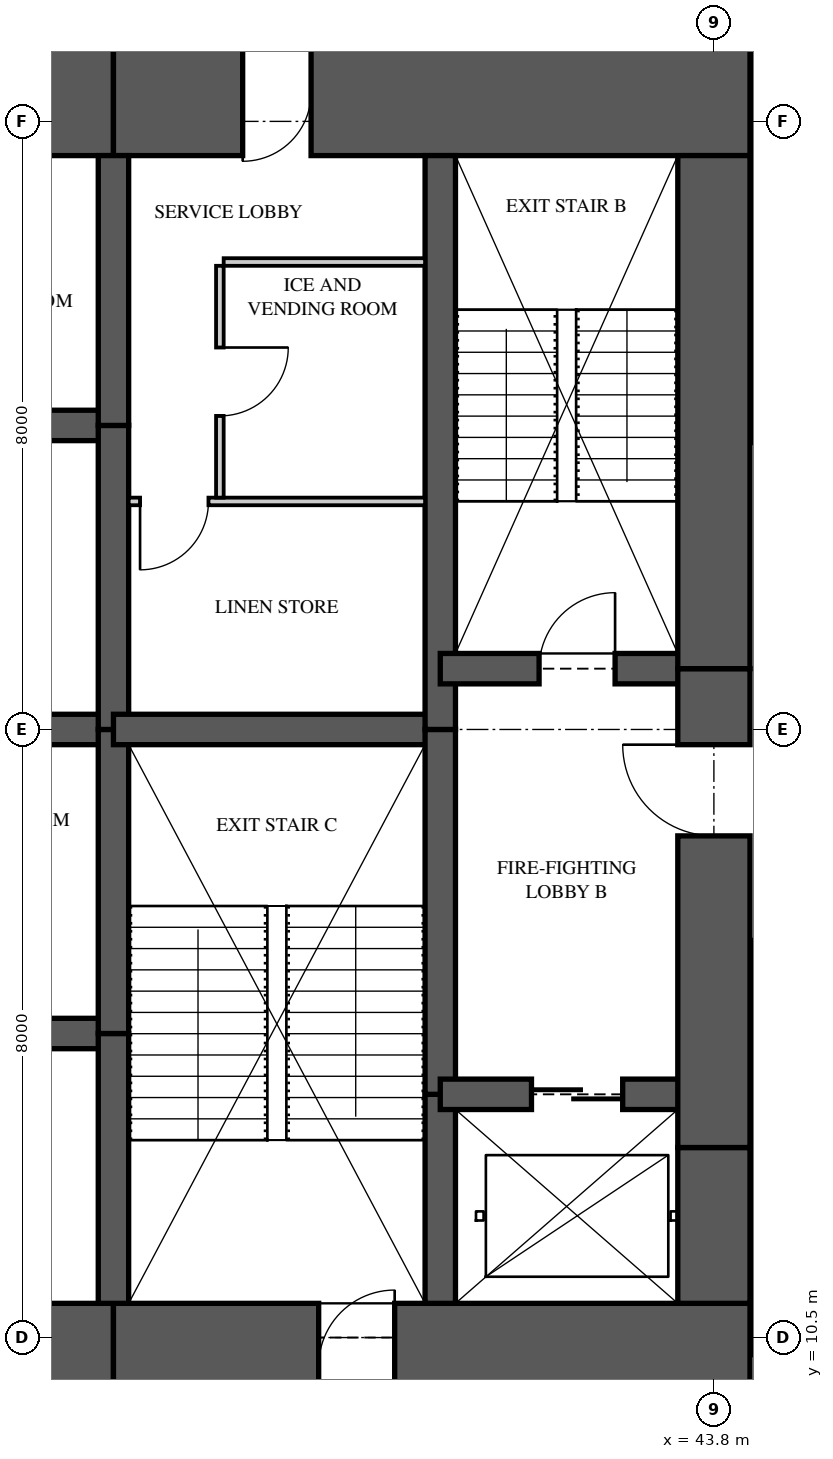
"""IFC4 building model, lengths in metres.
Left out: names, types, materials, properties, quantities, classifications, styles, units other than length and angle.
Written with IfcOpenShell. Run it as: python <this file> out.ifc"""

import sys

from ifc_helpers import new_model, si_unit, direction, frame, frame_2d, origin, place, context, subcontext, project, spatial, rectangle, extrude, element, fill, save


model = new_model("IFC4")
c1 = context("Model", 3, precision=1e-05, world=origin(), true_north=direction((0.0, 1.0)))
c2 = subcontext(c1, "Body", "Model", "MODEL_VIEW")
j1 = project(units=[si_unit("LENGTHUNIT", "METRE"), si_unit("PLANEANGLEUNIT", "RADIAN")], contexts=[c1])
p1 = place(None, origin())
s1 = spatial("IfcSite", under=j1, at=p1, CompositionType="ELEMENT")
p2 = place(p1, origin())
s2 = spatial("IfcBuilding", under=s1, at=p2, CompositionType="ELEMENT")
p3 = place(p2, frame((0.0, 0.0, 27.7)))
s3 = spatial("IfcBuildingStorey", under=s2, at=p3, CompositionType="ELEMENT", Elevation=27.7)
p4 = place(p3, frame((31.6, 10.125, 0.0), z_axis=(0.0, 0.0, 1.0), x_axis=(1.0, 0.0, 0.0)))
e1 = element("IfcWall", 1, at=p4, inside=s3, PredefinedType="SHEAR", context=c2, shape_type="SweptSolid", body=[
    extrude(rectangle(XDim=4.3, YDim=1.65, at=frame_2d((2.15, 0.0))), origin(), (0.0, 0.0, 1.0), 3.35),
])
p5 = place(p3, frame((35.9, 10.125, 0.0), z_axis=(0.0, 0.0, 1.0), x_axis=(1.0, 0.0, 0.0)))
e2 = element("IfcWall", 2, at=p5, inside=s3, PredefinedType="SHEAR", context=c2, shape_type="SweptSolid", body=[
    extrude(rectangle(XDim=8.375, YDim=1.65, at=frame_2d((4.188, 0.0))), origin(), (0.0, 0.0, 1.0), 3.35),
])
p6 = place(p5, frame((2.7, 0.0, 0.0)))
e3 = element("IfcOpeningElement", 3, at=p6, cuts=e2, PredefinedType="OPENING", context=c2, shape_type="SweptSolid", body=[
    extrude(rectangle(XDim=1.0, YDim=2.1, at=frame_2d((0.5, 1.05))), frame((0.0, 0.835, 0.0), z_axis=(0.0, -1.0, 0.0), x_axis=(1.0, 0.0, 0.0)), (0.0, 0.0, 1.0), 1.67),
])
p7 = place(p3, frame((44.275, 26.875, 0.0), z_axis=(0.0, 0.0, 1.0), x_axis=(-1.0, 0.0, 0.0)))
e4 = element("IfcWall", 4, at=p7, inside=s3, PredefinedType="SHEAR", context=c2, shape_type="SweptSolid", body=[
    extrude(rectangle(XDim=8.375, YDim=1.65, at=frame_2d((4.188, 0.0))), origin(), (0.0, 0.0, 1.0), 3.35),
])
p8 = place(p7, frame((5.775, 0.0, 0.0)))
e5 = element("IfcOpeningElement", 5, at=p8, cuts=e4, PredefinedType="OPENING", context=c2, shape_type="SweptSolid", body=[
    extrude(rectangle(XDim=0.9, YDim=2.1, at=frame_2d((0.45, 1.05))), frame((0.0, 0.835, 0.0), z_axis=(0.0, -1.0, 0.0), x_axis=(1.0, 0.0, 0.0)), (0.0, 0.0, 1.0), 1.67),
])
p9 = place(p3, frame((35.9, 26.875, 0.0), z_axis=(0.0, 0.0, 1.0), x_axis=(-1.0, 0.0, 0.0)))
e6 = element("IfcWall", 6, at=p9, inside=s3, PredefinedType="SHEAR", context=c2, shape_type="SweptSolid", body=[
    extrude(rectangle(XDim=4.3, YDim=1.65, at=frame_2d((2.15, 0.0))), origin(), (0.0, 0.0, 1.0), 3.35),
])
p10 = place(p3, frame((43.8, 10.95, 0.0), z_axis=(0.0, 0.0, 1.0), x_axis=(0.0, 1.0, 0.0)))
e7 = element("IfcWall", 7, at=p10, inside=s3, PredefinedType="SHEAR", context=c2, shape_type="SweptSolid", body=[
    extrude(rectangle(XDim=2.05, YDim=0.95, at=frame_2d((1.025, 0.0))), origin(), (0.0, 0.0, 1.0), 3.35),
])
p11 = place(p3, frame((43.8, 13.0, 0.0), z_axis=(0.0, 0.0, 1.0), x_axis=(0.0, 1.0, 0.0)))
e8 = element("IfcWall", 8, at=p11, inside=s3, PredefinedType="SHEAR", context=c2, shape_type="SweptSolid", body=[
    extrude(rectangle(XDim=6.3, YDim=0.95, at=frame_2d((3.15, 0.0))), origin(), (0.0, 0.0, 1.0), 3.35),
])
p12 = place(p11, frame((4.1, 0.0, 0.0)))
e9 = element("IfcOpeningElement", 9, at=p12, cuts=e8, PredefinedType="OPENING", context=c2, shape_type="SweptSolid", body=[
    extrude(rectangle(XDim=1.2, YDim=2.2, at=frame_2d((0.6, 1.1))), frame((0.0, 0.485, 0.0), z_axis=(0.0, -1.0, 0.0), x_axis=(1.0, 0.0, 0.0)), (0.0, 0.0, 1.0), 0.97),
])
p13 = place(p3, frame((43.8, 19.3, 0.0), z_axis=(0.0, 0.0, 1.0), x_axis=(0.0, 1.0, 0.0)))
e10 = element("IfcWall", 10, at=p13, inside=s3, PredefinedType="SHEAR", context=c2, shape_type="SweptSolid", body=[
    extrude(rectangle(XDim=6.75, YDim=0.95, at=frame_2d((3.375, 0.0))), origin(), (0.0, 0.0, 1.0), 3.35),
])
p14 = place(p3, frame((35.9, 10.95, 0.0), z_axis=(0.0, 0.0, 1.0), x_axis=(0.0, 1.0, 0.0)))
e11 = element("IfcWall", 11, at=p14, inside=s3, PredefinedType="SHEAR", context=c2, shape_type="SweptSolid", body=[
    extrude(rectangle(XDim=3.55, YDim=0.4, at=frame_2d((1.775, 0.0))), origin(), (0.0, 0.0, 1.0), 3.35),
])
for number, where, z_axis, x_axis in (
    (12, (35.9, 14.5, 0.0), (0.0, 0.0, 1.0), (0.0, 1.0, 0.0)),
    (13, (35.9, 18.5, 0.0), (0.0, 0.0, 1.0), (0.0, 1.0, 0.0)),
):
    element("IfcWall", number, at=place(p3, frame(where, z_axis=z_axis, x_axis=x_axis)), inside=s3, PredefinedType="SHEAR", context=c2, shape_type="SweptSolid", body=[
        extrude(rectangle(XDim=4.0, YDim=0.4, at=frame_2d((2.0, 0.0))), origin(), (0.0, 0.0, 1.0), 3.35),
    ])
p15 = place(p3, frame((35.9, 22.5, 0.0), z_axis=(0.0, 0.0, 1.0), x_axis=(0.0, 1.0, 0.0)))
e14 = element("IfcWall", 14, at=p15, inside=s3, PredefinedType="SHEAR", context=c2, shape_type="SweptSolid", body=[
    extrude(rectangle(XDim=3.55, YDim=0.4, at=frame_2d((1.775, 0.0))), origin(), (0.0, 0.0, 1.0), 3.35),
])
p16 = place(p3, frame((40.2, 10.95, 0.0), z_axis=(0.0, 0.0, 1.0), x_axis=(0.0, 1.0, 0.0)))
e15 = element("IfcWall", 15, at=p16, inside=s3, PredefinedType="SHEAR", context=c2, shape_type="SweptSolid", body=[
    extrude(rectangle(XDim=2.75, YDim=0.4, at=frame_2d((1.375, 0.0))), origin(), (0.0, 0.0, 1.0), 3.35),
])
p17 = place(p3, frame((40.2, 13.7, 0.0), z_axis=(0.0, 0.0, 1.0), x_axis=(0.0, 1.0, 0.0)))
e16 = element("IfcWall", 16, at=p17, inside=s3, PredefinedType="SHEAR", context=c2, shape_type="SweptSolid", body=[
    extrude(rectangle(XDim=4.8, YDim=0.4, at=frame_2d((2.4, 0.0))), origin(), (0.0, 0.0, 1.0), 3.35),
])
p18 = place(p3, frame((40.2, 18.5, 0.0), z_axis=(0.0, 0.0, 1.0), x_axis=(0.0, 1.0, 0.0)))
e17 = element("IfcWall", 17, at=p18, inside=s3, PredefinedType="SHEAR", context=c2, shape_type="SweptSolid", body=[
    extrude(rectangle(XDim=7.55, YDim=0.4, at=frame_2d((3.775, 0.0))), origin(), (0.0, 0.0, 1.0), 3.35),
])
for number, where, z_axis, x_axis in (
    (18, (31.6, 14.5, 0.0), (0.0, 0.0, 1.0), (1.0, 0.0, 0.0)),
    (19, (31.6, 18.5, 0.0), (0.0, 0.0, 1.0), (1.0, 0.0, 0.0)),
    (20, (31.6, 22.5, 0.0), (0.0, 0.0, 1.0), (1.0, 0.0, 0.0)),
):
    element("IfcWall", number, at=place(p3, frame(where, z_axis=z_axis, x_axis=x_axis)), inside=s3, PredefinedType="SHEAR", context=c2, shape_type="SweptSolid", body=[
        extrude(rectangle(XDim=4.3, YDim=0.4, at=frame_2d((2.15, 0.0))), origin(), (0.0, 0.0, 1.0), 3.35),
    ])
p19 = place(p3, frame((35.9, 18.5, 0.0), z_axis=(0.0, 0.0, 1.0), x_axis=(1.0, 0.0, 0.0)))
e21 = element("IfcWall", 21, at=p19, inside=s3, PredefinedType="SHEAR", context=c2, shape_type="SweptSolid", body=[
    extrude(rectangle(XDim=4.3, YDim=0.4, at=frame_2d((2.15, 0.0))), origin(), (0.0, 0.0, 1.0), 3.35),
])
p20 = place(p3, frame((40.2, 13.7, 0.0), z_axis=(0.0, 0.0, 1.0), x_axis=(1.0, 0.0, 0.0)))
e22 = element("IfcWall", 22, at=p20, inside=s3, PredefinedType="SHEAR", context=c2, shape_type="SweptSolid", body=[
    extrude(rectangle(XDim=3.6, YDim=0.4, at=frame_2d((1.8, 0.0))), origin(), (0.0, 0.0, 1.0), 3.35),
])
p21 = place(p20, frame((1.2, 0.0, 0.0)))
e23 = element("IfcOpeningElement", 23, at=p21, cuts=e22, PredefinedType="OPENING", context=c2, shape_type="SweptSolid", body=[
    extrude(rectangle(XDim=1.2, YDim=2.1, at=frame_2d((0.6, 1.05))), frame((0.0, 0.21, 0.0), z_axis=(0.0, -1.0, 0.0), x_axis=(1.0, 0.0, 0.0)), (0.0, 0.0, 1.0), 0.42),
])
p22 = place(p3, frame((40.2, 19.3, 0.0), z_axis=(0.0, 0.0, 1.0), x_axis=(1.0, 0.0, 0.0)))
e24 = element("IfcWall", 24, at=p22, inside=s3, PredefinedType="SHEAR", context=c2, shape_type="SweptSolid", body=[
    extrude(rectangle(XDim=3.6, YDim=0.4, at=frame_2d((1.8, 0.0))), origin(), (0.0, 0.0, 1.0), 3.35),
])
p23 = place(p22, frame((1.3, 0.0, 0.0)))
e25 = element("IfcOpeningElement", 25, at=p23, cuts=e24, PredefinedType="OPENING", context=c2, shape_type="SweptSolid", body=[
    extrude(rectangle(XDim=1.0, YDim=2.1, at=frame_2d((0.5, 1.05))), frame((0.0, 0.21, 0.0), z_axis=(0.0, -1.0, 0.0), x_axis=(1.0, 0.0, 0.0)), (0.0, 0.0, 1.0), 0.42),
])
p24 = place(p3, frame((37.35, 24.65, 0.0), z_axis=(0.0, 0.0, 1.0), x_axis=(1.0, 0.0, 0.0)))
e26 = element("IfcWall", 26, at=p24, inside=s3, PredefinedType="PARTITIONING", context=c2, shape_type="SweptSolid", body=[
    extrude(rectangle(XDim=2.65, YDim=0.1, at=frame_2d((1.325, 0.0))), origin(), (0.0, 0.0, 1.0), 3.11),
])
p25 = place(p3, frame((37.3, 21.55, 0.0), z_axis=(0.0, 0.0, 1.0), x_axis=(0.0, 1.0, 0.0)))
e27 = element("IfcWall", 27, at=p25, inside=s3, PredefinedType="PARTITIONING", context=c2, shape_type="SweptSolid", body=[
    extrude(rectangle(XDim=3.05, YDim=0.1, at=frame_2d((1.525, 0.0))), origin(), (0.0, 0.0, 1.0), 3.11),
])
p26 = place(p25, frame((1.075, 0.0, 0.0)))
e28 = element("IfcOpeningElement", 28, at=p26, cuts=e27, PredefinedType="OPENING", context=c2, shape_type="SweptSolid", body=[
    extrude(rectangle(XDim=0.9, YDim=2.1, at=frame_2d((0.45, 1.05))), frame((0.0, 0.06, 0.0), z_axis=(0.0, -1.0, 0.0), x_axis=(1.0, 0.0, 0.0)), (0.0, 0.0, 1.0), 0.12),
])
p27 = place(p3, frame((36.1, 21.5, 0.0), z_axis=(0.0, 0.0, 1.0), x_axis=(1.0, 0.0, 0.0)))
e29 = element("IfcWall", 29, at=p27, inside=s3, PredefinedType="PARTITIONING", context=c2, shape_type="SweptSolid", body=[
    extrude(rectangle(XDim=3.9, YDim=0.1, at=frame_2d((1.95, 0.0))), origin(), (0.0, 0.0, 1.0), 3.11),
])
p28 = place(p27, frame((0.15, 0.0, 0.0)))
e30 = element("IfcOpeningElement", 30, at=p28, cuts=e29, PredefinedType="OPENING", context=c2, shape_type="SweptSolid", body=[
    extrude(rectangle(XDim=0.9, YDim=2.1, at=frame_2d((0.45, 1.05))), frame((0.0, 0.06, 0.0), z_axis=(0.0, -1.0, 0.0), x_axis=(1.0, 0.0, 0.0)), (0.0, 0.0, 1.0), 0.12),
])
p29 = place(p26, frame((0.9, 0.0, 0.0), z_axis=(0.0, 0.0, 1.0), x_axis=(-1.0, 0.0, 0.0)))
e31 = element("IfcDoor", 31, at=p29, inside=s3, OperationType="SINGLE_SWING_LEFT", PredefinedType="DOOR", context=c2, shape_type="SweptSolid", body=[
    extrude(rectangle(XDim=0.9, YDim=2.1, at=frame_2d((0.45, 1.05))), frame((0.0, 0.025, 0.0), z_axis=(0.0, -1.0, 0.0), x_axis=(1.0, 0.0, 0.0)), (0.0, 0.0, 1.0), 0.05),
])
fill(e28, e31)
p30 = place(p28, frame((0.9, 0.0, 0.0), z_axis=(0.0, 0.0, 1.0), x_axis=(-1.0, 0.0, 0.0)))
e32 = element("IfcDoor", 32, at=p30, inside=s3, OperationType="SINGLE_SWING_RIGHT", PredefinedType="DOOR", context=c2, shape_type="SweptSolid", body=[
    extrude(rectangle(XDim=0.9, YDim=2.1, at=frame_2d((0.45, 1.05))), frame((0.0, 0.025, 0.0), z_axis=(0.0, -1.0, 0.0), x_axis=(1.0, 0.0, 0.0)), (0.0, 0.0, 1.0), 0.05),
])
fill(e30, e32)
p31 = place(p23, origin())
e33 = element("IfcDoor", 33, at=p31, inside=s3, OperationType="SINGLE_SWING_RIGHT", PredefinedType="DOOR", context=c2, shape_type="SweptSolid", body=[
    extrude(rectangle(XDim=1.0, YDim=2.1, at=frame_2d((0.5, 1.05))), frame((0.0, 0.025, 0.0), z_axis=(0.0, -1.0, 0.0), x_axis=(1.0, 0.0, 0.0)), (0.0, 0.0, 1.0), 0.05),
])
fill(e25, e33)
p32 = place(p12, origin())
e34 = element("IfcDoor", 34, at=p32, inside=s3, OperationType="SINGLE_SWING_RIGHT", PredefinedType="DOOR", context=c2, shape_type="SweptSolid", body=[
    extrude(rectangle(XDim=1.2, YDim=2.2, at=frame_2d((0.6, 1.1))), frame((0.0, 0.025, 0.0), z_axis=(0.0, -1.0, 0.0), x_axis=(1.0, 0.0, 0.0)), (0.0, 0.0, 1.0), 0.05),
])
fill(e9, e34)
p33 = place(p21, origin())
e35 = element("IfcDoor", 35, at=p33, inside=s3, OperationType="SLIDING_TO_LEFT", PredefinedType="DOOR", context=c2, shape_type="SweptSolid", body=[
    extrude(rectangle(XDim=1.2, YDim=2.1, at=frame_2d((0.6, 1.05))), frame((0.0, 0.025, 0.0), z_axis=(0.0, -1.0, 0.0), x_axis=(1.0, 0.0, 0.0)), (0.0, 0.0, 1.0), 0.05),
])
fill(e23, e35)
p34 = place(p6, origin())
e36 = element("IfcDoor", 36, at=p34, inside=s3, OperationType="SINGLE_SWING_RIGHT", PredefinedType="DOOR", context=c2, shape_type="SweptSolid", body=[
    extrude(rectangle(XDim=1.0, YDim=2.1, at=frame_2d((0.5, 1.05))), frame((0.0, 0.025, 0.0), z_axis=(0.0, -1.0, 0.0), x_axis=(1.0, 0.0, 0.0)), (0.0, 0.0, 1.0), 0.05),
])
fill(e3, e36)
p35 = place(p8, origin())
e37 = element("IfcDoor", 37, at=p35, inside=s3, OperationType="SINGLE_SWING_RIGHT", PredefinedType="DOOR", context=c2, shape_type="SweptSolid", body=[
    extrude(rectangle(XDim=0.9, YDim=2.1, at=frame_2d((0.45, 1.05))), frame((0.0, 0.47, 0.0), z_axis=(0.0, -1.0, 0.0), x_axis=(1.0, 0.0, 0.0)), (0.0, 0.0, 1.0), 0.8),
])
fill(e5, e37)
save(model, sys.argv[1])
